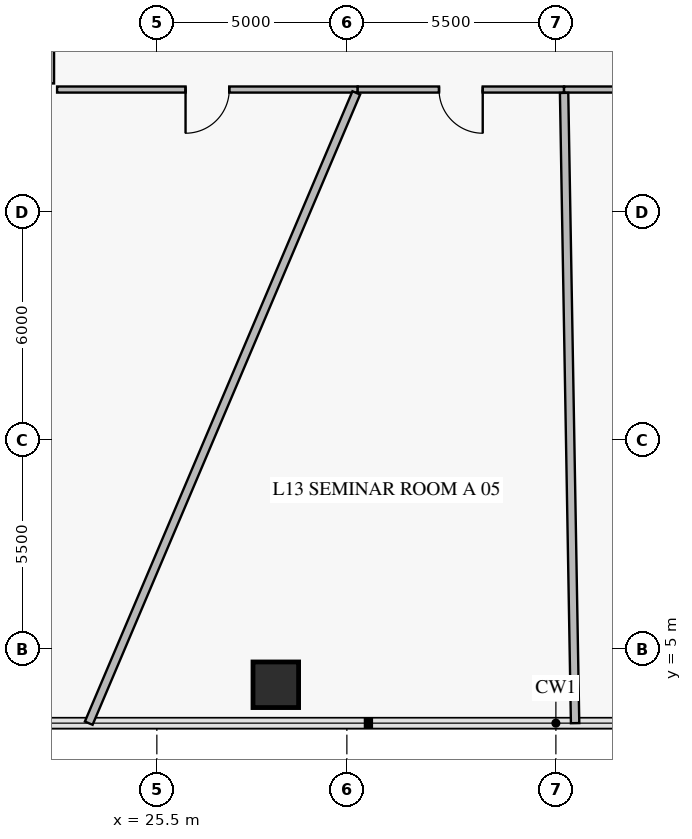
"""IFC4 building model, lengths in metres.
Left out: names, types, materials, properties, quantities, classifications, styles, units other than length and angle.
Written with IfcOpenShell. Run it as: python <this file> out.ifc"""

import sys

from ifc_helpers import new_model, si_unit, direction, frame, frame_2d, origin, origin_2d, place, context, subcontext, project, spatial, rectangle, extrude, element, fill, save


model = new_model("IFC4")
c1 = context("Model", 3, precision=1e-05, world=origin(), true_north=direction((0.0, 1.0)))
c2 = subcontext(c1, "Body", "Model", "MODEL_VIEW")
j1 = project(units=[si_unit("LENGTHUNIT", "METRE"), si_unit("PLANEANGLEUNIT", "RADIAN")], contexts=[c1])
p1 = place(None, origin())
s1 = spatial("IfcSite", under=j1, at=p1, CompositionType="ELEMENT")
p2 = place(p1, origin())
s2 = spatial("IfcBuilding", under=s1, at=p2, CompositionType="ELEMENT")
p3 = place(p2, frame((0.0, 0.0, 54.0)))
s3 = spatial("IfcBuildingStorey", under=s2, at=p3, CompositionType="ELEMENT", Elevation=54.0)
p4 = place(p3, frame((28.63, 4.052, 0.0), z_axis=(0.0, 0.0, 1.0), x_axis=(1.0, 0.0, 0.0)))
e1 = element("IfcColumn", 1, at=p4, inside=s3, PredefinedType="COLUMN", context=c2, shape_type="SweptSolid", body=[
    extrude(rectangle(XDim=1.2, YDim=1.2, at=origin_2d()), origin(), (0.0, 0.0, 1.0), 3.92),
])
p5 = place(p3, frame((22.875, 19.715, 0.0), z_axis=(0.0, 0.0, 1.0), x_axis=(1.0, 0.0, 0.0)))
e2 = element("IfcWall", 2, at=p5, inside=s3, PredefinedType="PARTITIONING", context=c2, shape_type="SweptSolid", body=[
    extrude(rectangle(XDim=7.91, YDim=0.16, at=frame_2d((3.955, 0.0))), origin(), (0.0, 0.0, 1.0), 3.22),
])
p6 = place(p5, frame((3.38, 0.0, 0.0)))
e3 = element("IfcOpeningElement", 3, at=p6, cuts=e2, PredefinedType="OPENING", context=c2, shape_type="SweptSolid", body=[
    extrude(rectangle(XDim=1.15, YDim=2.2, at=frame_2d((0.575, 1.1))), frame((0.0, 0.092, 0.0), z_axis=(0.0, -1.0, 0.0), x_axis=(1.0, 0.0, 0.0)), (0.0, 0.0, 1.0), 0.184),
])
p7 = place(p3, frame((30.785, 19.715, 0.0), z_axis=(0.0, 0.0, 1.0), x_axis=(1.0, 0.0, 0.0)))
e4 = element("IfcWall", 4, at=p7, inside=s3, PredefinedType="PARTITIONING", context=c2, shape_type="SweptSolid", body=[
    extrude(rectangle(XDim=5.429, YDim=0.16, at=frame_2d((2.714, 0.0))), origin(), (0.0, 0.0, 1.0), 3.22),
])
p8 = place(p7, frame((2.139, 0.0, 0.0)))
e5 = element("IfcOpeningElement", 5, at=p8, cuts=e4, PredefinedType="OPENING", context=c2, shape_type="SweptSolid", body=[
    extrude(rectangle(XDim=1.15, YDim=2.2, at=frame_2d((0.575, 1.1))), frame((0.0, 0.092, 0.0), z_axis=(0.0, -1.0, 0.0), x_axis=(1.0, 0.0, 0.0)), (0.0, 0.0, 1.0), 0.184),
])
p9 = place(p3, frame((36.214, 19.715, 0.0), z_axis=(0.0, 0.0, 1.0), x_axis=(1.0, 0.0, 0.0)))
e6 = element("IfcWall", 6, at=p9, inside=s3, PredefinedType="PARTITIONING", context=c2, shape_type="SweptSolid", body=[
    extrude(rectangle(XDim=5.514, YDim=0.16, at=frame_2d((2.757, 0.0))), origin(), (0.0, 0.0, 1.0), 3.22),
])
p10 = place(p9, frame((2.182, 0.0, 0.0)))
e7 = element("IfcOpeningElement", 7, at=p10, cuts=e6, PredefinedType="OPENING", context=c2, shape_type="SweptSolid", body=[
    extrude(rectangle(XDim=1.15, YDim=2.2, at=frame_2d((0.575, 1.1))), frame((0.0, 0.092, 0.0), z_axis=(0.0, -1.0, 0.0), x_axis=(1.0, 0.0, 0.0)), (0.0, 0.0, 1.0), 0.184),
])
p11 = place(p3, frame((22.715, 27.301, 0.0), z_axis=(0.0, 0.0, 1.0), x_axis=(0.0, -1.0, 0.0)))
e8 = element("IfcWall", 8, at=p11, inside=s3, PredefinedType="PARTITIONING", context=c2, shape_type="SweptSolid", body=[
    extrude(rectangle(XDim=7.426, YDim=0.16, at=frame_2d((3.713, 0.0))), origin(), (0.0, 0.0, 1.0), 3.92),
])
p12 = place(p3, frame((30.748, 19.627, 0.0), z_axis=(0.0, 0.0, 1.0), x_axis=(-0.39073948494, -0.920501306305, 0.0)))
e9 = element("IfcWall", 9, at=p12, inside=s3, PredefinedType="PARTITIONING", context=c2, shape_type="SweptSolid", body=[
    extrude(rectangle(XDim=18.018, YDim=0.22, at=frame_2d((9.009, 0.0))), origin(), (0.0, 0.0, 1.0), 3.17),
])
p13 = place(p3, frame((36.216, 19.627, 0.0), z_axis=(0.0, 0.0, 1.0), x_axis=(0.01745546123, -0.99984764183, 0.0)))
e10 = element("IfcWall", 10, at=p13, inside=s3, PredefinedType="PARTITIONING", context=c2, shape_type="SweptSolid", body=[
    extrude(rectangle(XDim=16.588, YDim=0.22, at=frame_2d((8.294, 0.0))), origin(), (0.0, 0.0, 1.0), 3.17),
])
p14 = place(p6, frame((1.15, 0.0, 0.0), z_axis=(0.0, 0.0, 1.0), x_axis=(-1.0, 0.0, 0.0)))
e11 = element("IfcDoor", 11, at=p14, inside=s3, OperationType="SINGLE_SWING_RIGHT", PredefinedType="DOOR", context=c2, shape_type="SweptSolid", body=[
    extrude(rectangle(XDim=1.15, YDim=2.2, at=frame_2d((0.575, 1.1))), frame((0.0, 0.025, 0.0), z_axis=(0.0, -1.0, 0.0), x_axis=(1.0, 0.0, 0.0)), (0.0, 0.0, 1.0), 0.05),
])
fill(e3, e11)
p15 = place(p8, frame((1.15, 0.0, 0.0), z_axis=(0.0, 0.0, 1.0), x_axis=(-1.0, 0.0, 0.0)))
e12 = element("IfcDoor", 12, at=p15, inside=s3, OperationType="SINGLE_SWING_LEFT", PredefinedType="DOOR", context=c2, shape_type="SweptSolid", body=[
    extrude(rectangle(XDim=1.15, YDim=2.2, at=frame_2d((0.575, 1.1))), frame((0.0, 0.025, 0.0), z_axis=(0.0, -1.0, 0.0), x_axis=(1.0, 0.0, 0.0)), (0.0, 0.0, 1.0), 0.05),
])
fill(e5, e12)
save(model, sys.argv[1])
